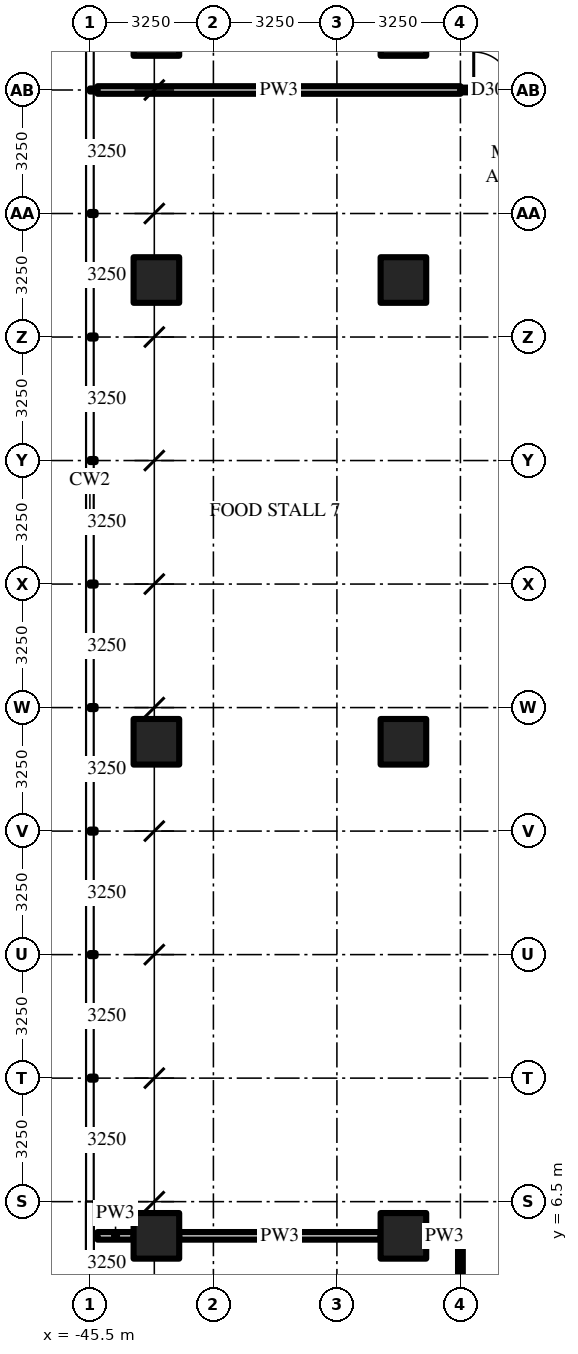
"""IFC4 building model, lengths in metres.
Left out: names, types, materials, properties, quantities, classifications, styles, units other than length and angle.
Written with IfcOpenShell. Run it as: python <this file> out.ifc"""

import sys

from ifc_helpers import new_model, si_unit, direction, frame, frame_2d, origin, origin_2d, place, context, subcontext, project, spatial, rectangle, extrude, source, transform, mapped, element, fill, save


model = new_model("IFC4")
c1 = context("Model", 3, precision=1e-05, world=origin(), true_north=direction((0.0, 1.0)))
c2 = subcontext(c1, "Body", "Model", "MODEL_VIEW")
j1 = project(units=[si_unit("LENGTHUNIT", "METRE"), si_unit("PLANEANGLEUNIT", "RADIAN")], contexts=[c1])
p1 = place(None, origin())
s1 = spatial("IfcSite", under=j1, at=p1, CompositionType="ELEMENT")
p2 = place(p1, origin())
s2 = spatial("IfcBuilding", under=s1, at=p2, CompositionType="ELEMENT")
p3 = place(p2, frame((0.0, 0.0, 8.0)))
s3 = spatial("IfcBuildingStorey", under=s2, at=p3, CompositionType="ELEMENT", Elevation=8.0)
m1 = source(origin(), c2, "Body", "SweptSolid", [
    extrude(rectangle(XDim=1.2, YDim=1.2, at=origin_2d()), origin(), (0.0, 0.0, 1.0), 6.0),
])
for number, where, z_axis, x_axis in (
    (1, (-37.25, 5.6, 0.0), (0.0, 0.0, 1.0), (1.0, 0.0, 0.0)),
    (2, (-37.25, 18.6, 0.0), (0.0, 0.0, 1.0), (1.0, 0.0, 0.0)),
    (3, (-37.25, 30.75, 0.0), (0.0, 0.0, 1.0), (1.0, 0.0, 0.0)),
    (4, (-37.25, 37.25, 0.0), (0.0, 0.0, 1.0), (1.0, 0.0, 0.0)),
    (5, (-43.75, 5.6, 0.0), (0.0, 0.0, 1.0), (1.0, 0.0, 0.0)),
    (6, (-43.75, 18.6, 0.0), (0.0, 0.0, 1.0), (1.0, 0.0, 0.0)),
    (7, (-43.75, 30.75, 0.0), (0.0, 0.0, 1.0), (1.0, 0.0, 0.0)),
    (8, (-43.75, 37.25, 0.0), (0.0, 0.0, 1.0), (1.0, 0.0, 0.0)),
):
    element("IfcColumn", number, at=place(p3, frame(where, z_axis=z_axis, x_axis=x_axis)), inside=s3, PredefinedType="COLUMN", context=c2, shape_type="MappedRepresentation", body=[
        mapped(m1, transform((0.0, 0.0, 0.0))),
    ])
m2 = source(origin(), c2, "Body", "SweptSolid", [
    extrude(rectangle(XDim=5.4, YDim=0.125, at=frame_2d((2.7, 0.0))), origin(), (0.0, 0.0, 1.0), 4.997),
])
p4 = place(p3, frame((-35.75, 0.1, 0.0), z_axis=(0.0, 0.0, 1.0), x_axis=(0.0, 1.0, 0.0)))
e9 = element("IfcWall", 9, at=p4, inside=s3, PredefinedType="PARTITIONING", context=c2, shape_type="MappedRepresentation", body=[
    mapped(m2, transform((0.0, 0.0, 0.0))),
])
m3 = source(origin(), c2, "Body", "SweptSolid", [
    extrude(rectangle(XDim=0.95, YDim=0.2, at=frame_2d((0.475, 0.0))), origin(), (0.0, 0.0, 1.0), 5.7),
])
p5 = place(p3, frame((-45.3, 5.6, 0.0), z_axis=(0.0, 0.0, 1.0), x_axis=(1.0, 0.0, 0.0)))
e10 = element("IfcWall", 10, at=p5, inside=s3, PredefinedType="PARTITIONING", context=c2, shape_type="MappedRepresentation", body=[
    mapped(m3, transform((0.0, 0.0, 0.0))),
])
m4 = source(origin(), c2, "Body", "SweptSolid", [
    extrude(rectangle(XDim=5.3, YDim=0.2, at=frame_2d((2.65, 0.0))), origin(), (0.0, 0.0, 1.0), 4.997),
])
p6 = place(p3, frame((-43.15, 5.6, 0.0), z_axis=(0.0, 0.0, 1.0), x_axis=(1.0, 0.0, 0.0)))
e11 = element("IfcWall", 11, at=p6, inside=s3, PredefinedType="PARTITIONING", context=c2, shape_type="MappedRepresentation", body=[
    mapped(m4, transform((0.0, 0.0, 0.0))),
])
m5 = source(origin(), c2, "Body", "SweptSolid", [
    extrude(rectangle(XDim=0.962, YDim=0.2, at=frame_2d((0.481, 0.0))), origin(), (0.0, 0.0, 1.0), 4.997),
])
p7 = place(p3, frame((-36.65, 5.6, 0.0), z_axis=(0.0, 0.0, 1.0), x_axis=(1.0, 0.0, 0.0)))
e12 = element("IfcWall", 12, at=p7, inside=s3, PredefinedType="PARTITIONING", context=c2, shape_type="MappedRepresentation", body=[
    mapped(m5, transform((0.0, 0.0, 0.0))),
])
m6 = source(origin(), c2, "Body", "SweptSolid", [
    extrude(rectangle(XDim=9.55, YDim=0.2, at=frame_2d((4.775, 0.0))), origin(), (0.0, 0.0, 1.0), 4.997),
])
p8 = place(p3, frame((-45.3, 35.75, 0.0), z_axis=(0.0, 0.0, 1.0), x_axis=(1.0, 0.0, 0.0)))
e13 = element("IfcWall", 13, at=p8, inside=s3, PredefinedType="PARTITIONING", context=c2, shape_type="MappedRepresentation", body=[
    mapped(m6, transform((0.0, 0.0, 0.0))),
])
m7 = source(origin(), c2, "Body", "SweptSolid", [
    extrude(rectangle(XDim=9.85, YDim=0.125, at=frame_2d((4.925, 0.0))), origin(), (0.0, 0.0, 1.0), 4.997),
])
p9 = place(p3, frame((-35.75, 35.75, 0.0), z_axis=(0.0, 0.0, 1.0), x_axis=(1.0, 0.0, 0.0)))
e14 = element("IfcWall", 14, at=p9, inside=s3, PredefinedType="PARTITIONING", context=c2, shape_type="MappedRepresentation", body=[
    mapped(m7, transform((0.0, 0.0, 0.0))),
])
m8 = source(origin(), c2, "Body", "SweptSolid", [
    extrude(rectangle(XDim=1.0, YDim=2.1, at=frame_2d((0.5, 1.05))), frame((0.0, 0.073, 0.0), z_axis=(0.0, -1.0, 0.0), x_axis=(1.0, 0.0, 0.0)), (0.0, 0.0, 1.0), 0.145),
])
p10 = place(p9, frame((0.35, 0.0, 0.0)))
e15 = element("IfcOpeningElement", 15, at=p10, cuts=e14, PredefinedType="OPENING", context=c2, shape_type="MappedRepresentation", body=[
    mapped(m8, transform((0.0, 0.0, 0.0))),
])
m9 = source(origin(), c2, "Body", "SweptSolid", [
    extrude(rectangle(XDim=1.0, YDim=2.1, at=frame_2d((0.5, 1.05))), frame((0.0, 0.025, 0.0), z_axis=(0.0, -1.0, 0.0), x_axis=(1.0, 0.0, 0.0)), (0.0, 0.0, 1.0), 0.05),
])
p11 = place(p10, origin())
e16 = element("IfcDoor", 16, at=p11, inside=s3, OperationType="SINGLE_SWING_LEFT", PredefinedType="DOOR", context=c2, shape_type="MappedRepresentation", body=[
    mapped(m9, transform((0.0, 0.0, 0.0))),
])
fill(e15, e16)
save(model, sys.argv[1])
